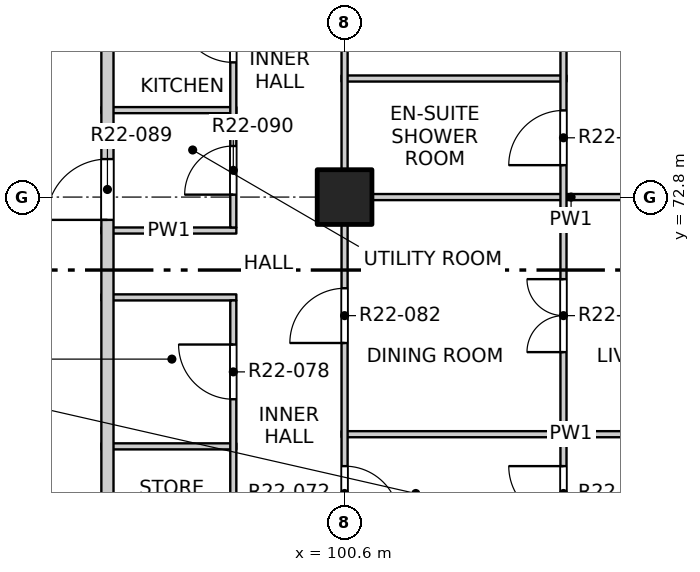
"""IFC4 building model, lengths in metres.
Left out: names, types, materials, properties, quantities, classifications, styles, units other than length and angle.
Written with IfcOpenShell. Run it as: python <this file> out.ifc"""

import sys

from ifc_helpers import new_model, si_unit, direction, frame, frame_2d, origin, origin_2d, place, context, subcontext, project, spatial, rectangle, extrude, element, fill, save


model = new_model("IFC4")
c1 = context("Model", 3, precision=1e-05, world=origin(), true_north=direction((0.0, 1.0)))
c2 = subcontext(c1, "Body", "Model", "MODEL_VIEW")
j1 = project(units=[si_unit("LENGTHUNIT", "METRE"), si_unit("PLANEANGLEUNIT", "RADIAN")], contexts=[c1])
p1 = place(None, origin())
s1 = spatial("IfcSite", under=j1, at=p1, CompositionType="ELEMENT")
p2 = place(p1, origin())
s2 = spatial("IfcBuilding", under=s1, at=p2, CompositionType="ELEMENT")
p3 = place(p2, frame((0.0, 0.0, 231.3)))
s3 = spatial("IfcBuildingStorey", under=s2, at=p3, CompositionType="ELEMENT", Elevation=231.3)
p4 = place(p3, frame((100.6, 72.8, -0.25), z_axis=(0.0, 0.0, 1.0), x_axis=(1.0, 0.0, 0.0)))
e1 = element("IfcColumn", 1, at=p4, inside=s3, PredefinedType="COLUMN", context=c2, shape_type="SweptSolid", body=[
    extrude(rectangle(XDim=0.9, YDim=0.9, at=origin_2d()), origin(), (0.0, 0.0, 1.0), 3.4),
])
p5 = place(p3, frame((96.6, 68.7, 0.0), z_axis=(0.0, 0.0, 1.0), x_axis=(1.0, 0.0, 0.0)))
e2 = element("IfcWall", 2, at=p5, inside=s3, PredefinedType="PARTITIONING", context=c2, shape_type="SweptSolid", body=[
    extrude(rectangle(XDim=2.22, YDim=0.1, at=frame_2d((1.11, 0.0))), origin(), (0.0, 0.0, 1.0), 2.55),
])
p6 = place(p3, frame((100.55, 68.9, 0.0), z_axis=(0.0, 0.0, 1.0), x_axis=(1.0, 0.0, 0.0)))
e3 = element("IfcWall", 3, at=p6, inside=s3, PredefinedType="PARTITIONING", context=c2, shape_type="SweptSolid", body=[
    extrude(rectangle(XDim=7.55, YDim=0.1, at=frame_2d((3.775, 0.0))), origin(), (0.0, 0.0, 1.0), 2.55),
])
for number, where, z_axis, x_axis in (
    (4, (96.6, 71.15, 0.0), (0.0, 0.0, 1.0), (1.0, 0.0, 0.0)),
    (5, (96.6, 72.25, 0.0), (0.0, 0.0, 1.0), (1.0, 0.0, 0.0)),
):
    element("IfcWall", number, at=place(p3, frame(where, z_axis=z_axis, x_axis=x_axis)), inside=s3, PredefinedType="PARTITIONING", context=c2, shape_type="SweptSolid", body=[
        extrude(rectangle(XDim=2.22, YDim=0.1, at=frame_2d((1.11, 0.0))), origin(), (0.0, 0.0, 1.0), 3.15),
    ])
p7 = place(p3, frame((100.55, 72.8, 0.0), z_axis=(0.0, 0.0, 1.0), x_axis=(1.0, 0.0, 0.0)))
e6 = element("IfcWall", 6, at=p7, inside=s3, PredefinedType="PARTITIONING", context=c2, shape_type="SweptSolid", body=[
    extrude(rectangle(XDim=7.55, YDim=0.1, at=frame_2d((3.775, 0.0))), origin(), (0.0, 0.0, 1.0), 3.15),
])
p8 = place(p3, frame((96.6, 74.23, 0.0), z_axis=(0.0, 0.0, 1.0), x_axis=(1.0, 0.0, 0.0)))
e7 = element("IfcWall", 7, at=p8, inside=s3, PredefinedType="PARTITIONING", context=c2, shape_type="SweptSolid", body=[
    extrude(rectangle(XDim=2.22, YDim=0.1, at=frame_2d((1.11, 0.0))), origin(), (0.0, 0.0, 1.0), 3.15),
])
p9 = place(p3, frame((100.55, 74.75, 0.0), z_axis=(0.0, 0.0, 1.0), x_axis=(1.0, 0.0, 0.0)))
e8 = element("IfcWall", 8, at=p9, inside=s3, PredefinedType="PARTITIONING", context=c2, shape_type="SweptSolid", body=[
    extrude(rectangle(XDim=3.7, YDim=0.1, at=frame_2d((1.85, 0.0))), origin(), (0.0, 0.0, 1.0), 3.15),
])
p10 = place(p3, frame((96.7, 49.5, 0.0), z_axis=(0.0, 0.0, 1.0), x_axis=(0.0, 1.0, 0.0)))
e9 = element("IfcWall", 9, at=p10, inside=s3, PredefinedType="PARTITIONING", context=c2, shape_type="SweptSolid", body=[
    extrude(rectangle(XDim=34.9, YDim=0.2, at=frame_2d((17.45, 0.0))), origin(), (0.0, 0.0, 1.0), 3.15),
])
p11 = place(p10, frame((9.675, 0.0, 0.0)))
e10 = element("IfcOpeningElement", 10, at=p11, cuts=e9, PredefinedType="OPENING", context=c2, shape_type="SweptSolid", body=[
    extrude(rectangle(XDim=1.0, YDim=2.1, at=frame_2d((0.5, 1.05))), frame((0.0, 0.11, 0.0), z_axis=(0.0, -1.0, 0.0), x_axis=(1.0, 0.0, 0.0)), (0.0, 0.0, 1.0), 0.22),
])
p12 = place(p10, frame((22.925, 0.0, 0.0)))
e11 = element("IfcOpeningElement", 11, at=p12, cuts=e9, PredefinedType="OPENING", context=c2, shape_type="SweptSolid", body=[
    extrude(rectangle(XDim=1.0, YDim=2.1, at=frame_2d((0.5, 1.05))), frame((0.0, 0.11, 0.0), z_axis=(0.0, -1.0, 0.0), x_axis=(1.0, 0.0, 0.0)), (0.0, 0.0, 1.0), 0.22),
])
p13 = place(p10, frame((33.025, 0.0, 0.0)))
e12 = element("IfcOpeningElement", 12, at=p13, cuts=e9, PredefinedType="OPENING", context=c2, shape_type="SweptSolid", body=[
    extrude(rectangle(XDim=1.0, YDim=2.1, at=frame_2d((0.5, 1.05))), frame((0.0, 0.11, 0.0), z_axis=(0.0, -1.0, 0.0), x_axis=(1.0, 0.0, 0.0)), (0.0, 0.0, 1.0), 0.22),
])
p14 = place(p3, frame((98.77, 59.05, 0.0), z_axis=(0.0, 0.0, 1.0), x_axis=(0.0, 1.0, 0.0)))
e13 = element("IfcWall", 13, at=p14, inside=s3, PredefinedType="PARTITIONING", context=c2, shape_type="SweptSolid", body=[
    extrude(rectangle(XDim=12.05, YDim=0.1, at=frame_2d((6.025, 0.0))), origin(), (0.0, 0.0, 1.0), 3.15),
])
p15 = place(p14, frame((0.55, 0.0, 0.0)))
e14 = element("IfcOpeningElement", 14, at=p15, cuts=e13, PredefinedType="OPENING", context=c2, shape_type="SweptSolid", body=[
    extrude(rectangle(XDim=0.9, YDim=2.1, at=frame_2d((0.45, 1.05))), frame((0.0, 0.06, 0.0), z_axis=(0.0, -1.0, 0.0), x_axis=(1.0, 0.0, 0.0)), (0.0, 0.0, 1.0), 0.12),
])
p16 = place(p14, frame((3.1, 0.0, 0.0)))
e15 = element("IfcOpeningElement", 15, at=p16, cuts=e13, PredefinedType="OPENING", context=c2, shape_type="SweptSolid", body=[
    extrude(rectangle(XDim=0.8, YDim=2.1, at=frame_2d((0.4, 1.05))), frame((0.0, 0.06, 0.0), z_axis=(0.0, -1.0, 0.0), x_axis=(1.0, 0.0, 0.0)), (0.0, 0.0, 1.0), 0.12),
])
p17 = place(p14, frame((5.4, 0.0, 0.0)))
e16 = element("IfcOpeningElement", 16, at=p17, cuts=e13, PredefinedType="OPENING", context=c2, shape_type="SweptSolid", body=[
    extrude(rectangle(XDim=0.9, YDim=2.1, at=frame_2d((0.45, 1.05))), frame((0.0, 0.06, 0.0), z_axis=(0.0, -1.0, 0.0), x_axis=(1.0, 0.0, 0.0)), (0.0, 0.0, 1.0), 0.12),
])
p18 = place(p14, frame((7.8, 0.0, 0.0)))
e17 = element("IfcOpeningElement", 17, at=p18, cuts=e13, PredefinedType="OPENING", context=c2, shape_type="SweptSolid", body=[
    extrude(rectangle(XDim=0.8, YDim=2.1, at=frame_2d((0.4, 1.05))), frame((0.0, 0.06, 0.0), z_axis=(0.0, -1.0, 0.0), x_axis=(1.0, 0.0, 0.0)), (0.0, 0.0, 1.0), 0.12),
])
p19 = place(p14, frame((10.425, 0.0, 0.0)))
e18 = element("IfcOpeningElement", 18, at=p19, cuts=e13, PredefinedType="OPENING", context=c2, shape_type="SweptSolid", body=[
    extrude(rectangle(XDim=0.9, YDim=2.1, at=frame_2d((0.45, 1.05))), frame((0.0, 0.06, 0.0), z_axis=(0.0, -1.0, 0.0), x_axis=(1.0, 0.0, 0.0)), (0.0, 0.0, 1.0), 0.12),
])
p20 = place(p3, frame((98.77, 72.3, 0.0), z_axis=(0.0, 0.0, 1.0), x_axis=(0.0, 1.0, 0.0)))
e19 = element("IfcWall", 19, at=p20, inside=s3, PredefinedType="PARTITIONING", context=c2, shape_type="SweptSolid", body=[
    extrude(rectangle(XDim=8.9, YDim=0.1, at=frame_2d((4.45, 0.0))), origin(), (0.0, 0.0, 1.0), 3.15),
])
p21 = place(p20, frame((0.54, 0.0, 0.0)))
e20 = element("IfcOpeningElement", 20, at=p21, cuts=e19, PredefinedType="OPENING", context=c2, shape_type="SweptSolid", body=[
    extrude(rectangle(XDim=0.8, YDim=2.1, at=frame_2d((0.4, 1.05))), frame((0.0, 0.06, 0.0), z_axis=(0.0, -1.0, 0.0), x_axis=(1.0, 0.0, 0.0)), (0.0, 0.0, 1.0), 0.12),
])
p22 = place(p20, frame((2.715, 0.0, 0.0)))
e21 = element("IfcOpeningElement", 21, at=p22, cuts=e19, PredefinedType="OPENING", context=c2, shape_type="SweptSolid", body=[
    extrude(rectangle(XDim=0.9, YDim=2.1, at=frame_2d((0.45, 1.05))), frame((0.0, 0.06, 0.0), z_axis=(0.0, -1.0, 0.0), x_axis=(1.0, 0.0, 0.0)), (0.0, 0.0, 1.0), 0.12),
])
p23 = place(p20, frame((5.3, 0.0, 0.0)))
e22 = element("IfcOpeningElement", 22, at=p23, cuts=e19, PredefinedType="OPENING", context=c2, shape_type="SweptSolid", body=[
    extrude(rectangle(XDim=0.9, YDim=2.1, at=frame_2d((0.45, 1.05))), frame((0.0, 0.06, 0.0), z_axis=(0.0, -1.0, 0.0), x_axis=(1.0, 0.0, 0.0)), (0.0, 0.0, 1.0), 0.12),
])
p24 = place(p20, frame((7.625, 0.0, 0.0)))
e23 = element("IfcOpeningElement", 23, at=p24, cuts=e19, PredefinedType="OPENING", context=c2, shape_type="SweptSolid", body=[
    extrude(rectangle(XDim=0.8, YDim=2.1, at=frame_2d((0.4, 1.05))), frame((0.0, 0.06, 0.0), z_axis=(0.0, -1.0, 0.0), x_axis=(1.0, 0.0, 0.0)), (0.0, 0.0, 1.0), 0.12),
])
p25 = place(p3, frame((100.6, 41.9, 0.0), z_axis=(0.0, 0.0, 1.0), x_axis=(0.0, 1.0, 0.0)))
e24 = element("IfcWall", 24, at=p25, inside=s3, PredefinedType="PARTITIONING", context=c2, shape_type="SweptSolid", body=[
    extrude(rectangle(XDim=46.2, YDim=0.1, at=frame_2d((23.1, 0.0))), origin(), (0.0, 0.0, 1.0), 3.15),
])
p26 = place(p25, frame((1.2, 0.0, 0.0)))
e25 = element("IfcOpeningElement", 25, at=p26, cuts=e24, PredefinedType="OPENING", context=c2, shape_type="SweptSolid", body=[
    extrude(rectangle(XDim=0.9, YDim=2.1, at=frame_2d((0.45, 1.05))), frame((0.0, 0.06, 0.0), z_axis=(0.0, -1.0, 0.0), x_axis=(1.0, 0.0, 0.0)), (0.0, 0.0, 1.0), 0.12),
])
p27 = place(p25, frame((6.025, 0.0, 0.0)))
e26 = element("IfcOpeningElement", 26, at=p27, cuts=e24, PredefinedType="OPENING", context=c2, shape_type="SweptSolid", body=[
    extrude(rectangle(XDim=0.9, YDim=2.1, at=frame_2d((0.45, 1.05))), frame((0.0, 0.06, 0.0), z_axis=(0.0, -1.0, 0.0), x_axis=(1.0, 0.0, 0.0)), (0.0, 0.0, 1.0), 0.12),
])
p28 = place(p25, frame((9.0, 0.0, 0.0)))
e27 = element("IfcOpeningElement", 27, at=p28, cuts=e24, PredefinedType="OPENING", context=c2, shape_type="SweptSolid", body=[
    extrude(rectangle(XDim=0.9, YDim=2.1, at=frame_2d((0.45, 1.05))), frame((0.0, 0.06, 0.0), z_axis=(0.0, -1.0, 0.0), x_axis=(1.0, 0.0, 0.0)), (0.0, 0.0, 1.0), 0.12),
])
p29 = place(p25, frame((12.9, 0.0, 0.0)))
e28 = element("IfcOpeningElement", 28, at=p29, cuts=e24, PredefinedType="OPENING", context=c2, shape_type="SweptSolid", body=[
    extrude(rectangle(XDim=0.9, YDim=2.1, at=frame_2d((0.45, 1.05))), frame((0.0, 0.06, 0.0), z_axis=(0.0, -1.0, 0.0), x_axis=(1.0, 0.0, 0.0)), (0.0, 0.0, 1.0), 0.12),
])
p30 = place(p25, frame((17.775, 0.0, 0.0)))
e29 = element("IfcOpeningElement", 29, at=p30, cuts=e24, PredefinedType="OPENING", context=c2, shape_type="SweptSolid", body=[
    extrude(rectangle(XDim=0.9, YDim=2.1, at=frame_2d((0.45, 1.05))), frame((0.0, 0.06, 0.0), z_axis=(0.0, -1.0, 0.0), x_axis=(1.0, 0.0, 0.0)), (0.0, 0.0, 1.0), 0.12),
])
p31 = place(p25, frame((21.625, 0.0, 0.0)))
e30 = element("IfcOpeningElement", 30, at=p31, cuts=e24, PredefinedType="OPENING", context=c2, shape_type="SweptSolid", body=[
    extrude(rectangle(XDim=0.9, YDim=2.1, at=frame_2d((0.45, 1.05))), frame((0.0, 0.06, 0.0), z_axis=(0.0, -1.0, 0.0), x_axis=(1.0, 0.0, 0.0)), (0.0, 0.0, 1.0), 0.12),
])
p32 = place(p25, frame((25.575, 0.0, 0.0)))
e31 = element("IfcOpeningElement", 31, at=p32, cuts=e24, PredefinedType="OPENING", context=c2, shape_type="SweptSolid", body=[
    extrude(rectangle(XDim=0.9, YDim=2.1, at=frame_2d((0.45, 1.05))), frame((0.0, 0.06, 0.0), z_axis=(0.0, -1.0, 0.0), x_axis=(1.0, 0.0, 0.0)), (0.0, 0.0, 1.0), 0.12),
])
p33 = place(p25, frame((28.5, 0.0, 0.0)))
e32 = element("IfcOpeningElement", 32, at=p33, cuts=e24, PredefinedType="OPENING", context=c2, shape_type="SweptSolid", body=[
    extrude(rectangle(XDim=0.9, YDim=2.1, at=frame_2d((0.45, 1.05))), frame((0.0, 0.06, 0.0), z_axis=(0.0, -1.0, 0.0), x_axis=(1.0, 0.0, 0.0)), (0.0, 0.0, 1.0), 0.12),
])
p34 = place(p25, frame((33.375, 0.0, 0.0)))
e33 = element("IfcOpeningElement", 33, at=p34, cuts=e24, PredefinedType="OPENING", context=c2, shape_type="SweptSolid", body=[
    extrude(rectangle(XDim=0.9, YDim=2.1, at=frame_2d((0.45, 1.05))), frame((0.0, 0.06, 0.0), z_axis=(0.0, -1.0, 0.0), x_axis=(1.0, 0.0, 0.0)), (0.0, 0.0, 1.0), 0.12),
])
p35 = place(p25, frame((36.3, 0.0, 0.0)))
e34 = element("IfcOpeningElement", 34, at=p35, cuts=e24, PredefinedType="OPENING", context=c2, shape_type="SweptSolid", body=[
    extrude(rectangle(XDim=0.9, YDim=2.1, at=frame_2d((0.45, 1.05))), frame((0.0, 0.06, 0.0), z_axis=(0.0, -1.0, 0.0), x_axis=(1.0, 0.0, 0.0)), (0.0, 0.0, 1.0), 0.12),
])
p36 = place(p25, frame((40.2, 0.0, 0.0)))
e35 = element("IfcOpeningElement", 35, at=p36, cuts=e24, PredefinedType="OPENING", context=c2, shape_type="SweptSolid", body=[
    extrude(rectangle(XDim=0.9, YDim=2.1, at=frame_2d((0.45, 1.05))), frame((0.0, 0.06, 0.0), z_axis=(0.0, -1.0, 0.0), x_axis=(1.0, 0.0, 0.0)), (0.0, 0.0, 1.0), 0.12),
])
p37 = place(p25, frame((44.1, 0.0, 0.0)))
e36 = element("IfcOpeningElement", 36, at=p37, cuts=e24, PredefinedType="OPENING", context=c2, shape_type="SweptSolid", body=[
    extrude(rectangle(XDim=0.9, YDim=2.1, at=frame_2d((0.45, 1.05))), frame((0.0, 0.06, 0.0), z_axis=(0.0, -1.0, 0.0), x_axis=(1.0, 0.0, 0.0)), (0.0, 0.0, 1.0), 0.12),
])
p38 = place(p3, frame((104.2, 41.9, 0.0), z_axis=(0.0, 0.0, 1.0), x_axis=(0.0, 1.0, 0.0)))
e37 = element("IfcWall", 37, at=p38, inside=s3, PredefinedType="PARTITIONING", context=c2, shape_type="SweptSolid", body=[
    extrude(rectangle(XDim=34.7, YDim=0.1, at=frame_2d((17.35, 0.0))), origin(), (0.0, 0.0, 1.0), 3.15),
])
p39 = place(p38, frame((1.05, 0.0, 0.0)))
e38 = element("IfcOpeningElement", 38, at=p39, cuts=e37, PredefinedType="OPENING", context=c2, shape_type="SweptSolid", body=[
    extrude(rectangle(XDim=1.2, YDim=2.1, at=frame_2d((0.6, 1.05))), frame((0.0, 0.06, 0.0), z_axis=(0.0, -1.0, 0.0), x_axis=(1.0, 0.0, 0.0)), (0.0, 0.0, 1.0), 0.12),
])
p40 = place(p38, frame((4.125, 0.0, 0.0)))
e39 = element("IfcOpeningElement", 39, at=p40, cuts=e37, PredefinedType="OPENING", context=c2, shape_type="SweptSolid", body=[
    extrude(rectangle(XDim=0.9, YDim=2.1, at=frame_2d((0.45, 1.05))), frame((0.0, 0.06, 0.0), z_axis=(0.0, -1.0, 0.0), x_axis=(1.0, 0.0, 0.0)), (0.0, 0.0, 1.0), 0.12),
])
p41 = place(p38, frame((6.075, 0.0, 0.0)))
e40 = element("IfcOpeningElement", 40, at=p41, cuts=e37, PredefinedType="OPENING", context=c2, shape_type="SweptSolid", body=[
    extrude(rectangle(XDim=0.9, YDim=2.1, at=frame_2d((0.45, 1.05))), frame((0.0, 0.06, 0.0), z_axis=(0.0, -1.0, 0.0), x_axis=(1.0, 0.0, 0.0)), (0.0, 0.0, 1.0), 0.12),
])
p42 = place(p38, frame((8.85, 0.0, 0.0)))
e41 = element("IfcOpeningElement", 41, at=p42, cuts=e37, PredefinedType="OPENING", context=c2, shape_type="SweptSolid", body=[
    extrude(rectangle(XDim=1.2, YDim=2.1, at=frame_2d((0.6, 1.05))), frame((0.0, 0.06, 0.0), z_axis=(0.0, -1.0, 0.0), x_axis=(1.0, 0.0, 0.0)), (0.0, 0.0, 1.0), 0.12),
])
p43 = place(p38, frame((12.75, 0.0, 0.0)))
e42 = element("IfcOpeningElement", 42, at=p43, cuts=e37, PredefinedType="OPENING", context=c2, shape_type="SweptSolid", body=[
    extrude(rectangle(XDim=1.2, YDim=2.1, at=frame_2d((0.6, 1.05))), frame((0.0, 0.06, 0.0), z_axis=(0.0, -1.0, 0.0), x_axis=(1.0, 0.0, 0.0)), (0.0, 0.0, 1.0), 0.12),
])
p44 = place(p38, frame((15.825, 0.0, 0.0)))
e43 = element("IfcOpeningElement", 43, at=p44, cuts=e37, PredefinedType="OPENING", context=c2, shape_type="SweptSolid", body=[
    extrude(rectangle(XDim=0.9, YDim=2.1, at=frame_2d((0.45, 1.05))), frame((0.0, 0.06, 0.0), z_axis=(0.0, -1.0, 0.0), x_axis=(1.0, 0.0, 0.0)), (0.0, 0.0, 1.0), 0.12),
])
p45 = place(p38, frame((17.775, 0.0, 0.0)))
e44 = element("IfcOpeningElement", 44, at=p45, cuts=e37, PredefinedType="OPENING", context=c2, shape_type="SweptSolid", body=[
    extrude(rectangle(XDim=0.9, YDim=2.1, at=frame_2d((0.45, 1.05))), frame((0.0, 0.06, 0.0), z_axis=(0.0, -1.0, 0.0), x_axis=(1.0, 0.0, 0.0)), (0.0, 0.0, 1.0), 0.12),
])
p46 = place(p38, frame((19.725, 0.0, 0.0)))
e45 = element("IfcOpeningElement", 45, at=p46, cuts=e37, PredefinedType="OPENING", context=c2, shape_type="SweptSolid", body=[
    extrude(rectangle(XDim=0.9, YDim=2.1, at=frame_2d((0.45, 1.05))), frame((0.0, 0.06, 0.0), z_axis=(0.0, -1.0, 0.0), x_axis=(1.0, 0.0, 0.0)), (0.0, 0.0, 1.0), 0.12),
])
p47 = place(p38, frame((21.675, 0.0, 0.0)))
e46 = element("IfcOpeningElement", 46, at=p47, cuts=e37, PredefinedType="OPENING", context=c2, shape_type="SweptSolid", body=[
    extrude(rectangle(XDim=0.9, YDim=2.1, at=frame_2d((0.45, 1.05))), frame((0.0, 0.06, 0.0), z_axis=(0.0, -1.0, 0.0), x_axis=(1.0, 0.0, 0.0)), (0.0, 0.0, 1.0), 0.12),
])
p48 = place(p38, frame((23.625, 0.0, 0.0)))
e47 = element("IfcOpeningElement", 47, at=p48, cuts=e37, PredefinedType="OPENING", context=c2, shape_type="SweptSolid", body=[
    extrude(rectangle(XDim=0.9, YDim=2.1, at=frame_2d((0.45, 1.05))), frame((0.0, 0.06, 0.0), z_axis=(0.0, -1.0, 0.0), x_axis=(1.0, 0.0, 0.0)), (0.0, 0.0, 1.0), 0.12),
])
p49 = place(p38, frame((25.575, 0.0, 0.0)))
e48 = element("IfcOpeningElement", 48, at=p49, cuts=e37, PredefinedType="OPENING", context=c2, shape_type="SweptSolid", body=[
    extrude(rectangle(XDim=0.9, YDim=2.1, at=frame_2d((0.45, 1.05))), frame((0.0, 0.06, 0.0), z_axis=(0.0, -1.0, 0.0), x_axis=(1.0, 0.0, 0.0)), (0.0, 0.0, 1.0), 0.12),
])
p50 = place(p38, frame((28.35, 0.0, 0.0)))
e49 = element("IfcOpeningElement", 49, at=p50, cuts=e37, PredefinedType="OPENING", context=c2, shape_type="SweptSolid", body=[
    extrude(rectangle(XDim=1.2, YDim=2.1, at=frame_2d((0.6, 1.05))), frame((0.0, 0.06, 0.0), z_axis=(0.0, -1.0, 0.0), x_axis=(1.0, 0.0, 0.0)), (0.0, 0.0, 1.0), 0.12),
])
p51 = place(p38, frame((31.425, 0.0, 0.0)))
e50 = element("IfcOpeningElement", 50, at=p51, cuts=e37, PredefinedType="OPENING", context=c2, shape_type="SweptSolid", body=[
    extrude(rectangle(XDim=0.9, YDim=2.1, at=frame_2d((0.45, 1.05))), frame((0.0, 0.06, 0.0), z_axis=(0.0, -1.0, 0.0), x_axis=(1.0, 0.0, 0.0)), (0.0, 0.0, 1.0), 0.12),
])
p52 = place(p38, frame((33.375, 0.0, 0.0)))
e51 = element("IfcOpeningElement", 51, at=p52, cuts=e37, PredefinedType="OPENING", context=c2, shape_type="SweptSolid", body=[
    extrude(rectangle(XDim=0.9, YDim=2.1, at=frame_2d((0.45, 1.05))), frame((0.0, 0.06, 0.0), z_axis=(0.0, -1.0, 0.0), x_axis=(1.0, 0.0, 0.0)), (0.0, 0.0, 1.0), 0.12),
])
p53 = place(p32, origin())
e52 = element("IfcDoor", 52, at=p53, inside=s3, OperationType="SINGLE_SWING_RIGHT", PredefinedType="DOOR", context=c2, shape_type="SweptSolid", body=[
    extrude(rectangle(XDim=0.9, YDim=2.1, at=frame_2d((0.45, 1.05))), frame((0.0, 0.025, 0.0), z_axis=(0.0, -1.0, 0.0), x_axis=(1.0, 0.0, 0.0)), (0.0, 0.0, 1.0), 0.05),
])
fill(e31, e52)
p54 = place(p49, origin())
e53 = element("IfcDoor", 53, at=p54, inside=s3, OperationType="SINGLE_SWING_RIGHT", PredefinedType="DOOR", context=c2, shape_type="SweptSolid", body=[
    extrude(rectangle(XDim=0.9, YDim=2.1, at=frame_2d((0.45, 1.05))), frame((0.0, 0.025, 0.0), z_axis=(0.0, -1.0, 0.0), x_axis=(1.0, 0.0, 0.0)), (0.0, 0.0, 1.0), 0.05),
])
fill(e48, e53)
p55 = place(p19, origin())
e54 = element("IfcDoor", 54, at=p55, inside=s3, OperationType="SINGLE_SWING_RIGHT", PredefinedType="DOOR", context=c2, shape_type="SweptSolid", body=[
    extrude(rectangle(XDim=0.9, YDim=2.1, at=frame_2d((0.45, 1.05))), frame((0.0, 0.025, 0.0), z_axis=(0.0, -1.0, 0.0), x_axis=(1.0, 0.0, 0.0)), (0.0, 0.0, 1.0), 0.05),
])
fill(e18, e54)
p56 = place(p33, origin())
e55 = element("IfcDoor", 55, at=p56, inside=s3, OperationType="SINGLE_SWING_LEFT", PredefinedType="DOOR", context=c2, shape_type="SweptSolid", body=[
    extrude(rectangle(XDim=0.9, YDim=2.1, at=frame_2d((0.45, 1.05))), frame((0.0, 0.025, 0.0), z_axis=(0.0, -1.0, 0.0), x_axis=(1.0, 0.0, 0.0)), (0.0, 0.0, 1.0), 0.05),
])
fill(e32, e55)
p57 = place(p50, origin())
e56 = element("IfcDoor", 56, at=p57, inside=s3, OperationType="DOUBLE_DOOR_SINGLE_SWING", PredefinedType="DOOR", context=c2, shape_type="SweptSolid", body=[
    extrude(rectangle(XDim=1.2, YDim=2.1, at=frame_2d((0.6, 1.05))), frame((0.0, 0.025, 0.0), z_axis=(0.0, -1.0, 0.0), x_axis=(1.0, 0.0, 0.0)), (0.0, 0.0, 1.0), 0.05),
])
fill(e49, e56)
p58 = place(p12, origin())
e57 = element("IfcDoor", 57, at=p58, inside=s3, OperationType="SINGLE_SWING_LEFT", PredefinedType="DOOR", context=c2, shape_type="SweptSolid", body=[
    extrude(rectangle(XDim=1.0, YDim=2.1, at=frame_2d((0.5, 1.05))), frame((0.0, 0.025, 0.0), z_axis=(0.0, -1.0, 0.0), x_axis=(1.0, 0.0, 0.0)), (0.0, 0.0, 1.0), 0.05),
])
fill(e11, e57)
p59 = place(p21, origin())
e58 = element("IfcDoor", 58, at=p59, inside=s3, OperationType="SINGLE_SWING_LEFT", PredefinedType="DOOR", context=c2, shape_type="SweptSolid", body=[
    extrude(rectangle(XDim=0.8, YDim=2.1, at=frame_2d((0.4, 1.05))), frame((0.0, 0.025, 0.0), z_axis=(0.0, -1.0, 0.0), x_axis=(1.0, 0.0, 0.0)), (0.0, 0.0, 1.0), 0.05),
])
fill(e20, e58)
p60 = place(p51, origin())
e59 = element("IfcDoor", 59, at=p60, inside=s3, OperationType="SINGLE_SWING_LEFT", PredefinedType="DOOR", context=c2, shape_type="SweptSolid", body=[
    extrude(rectangle(XDim=0.9, YDim=2.1, at=frame_2d((0.45, 1.05))), frame((0.0, 0.025, 0.0), z_axis=(0.0, -1.0, 0.0), x_axis=(1.0, 0.0, 0.0)), (0.0, 0.0, 1.0), 0.05),
])
fill(e50, e59)
p61 = place(p22, origin())
e60 = element("IfcDoor", 60, at=p61, inside=s3, OperationType="SINGLE_SWING_RIGHT", PredefinedType="DOOR", context=c2, shape_type="SweptSolid", body=[
    extrude(rectangle(XDim=0.9, YDim=2.1, at=frame_2d((0.45, 1.05))), frame((0.0, 0.025, 0.0), z_axis=(0.0, -1.0, 0.0), x_axis=(1.0, 0.0, 0.0)), (0.0, 0.0, 1.0), 0.05),
])
fill(e21, e60)
save(model, sys.argv[1])
